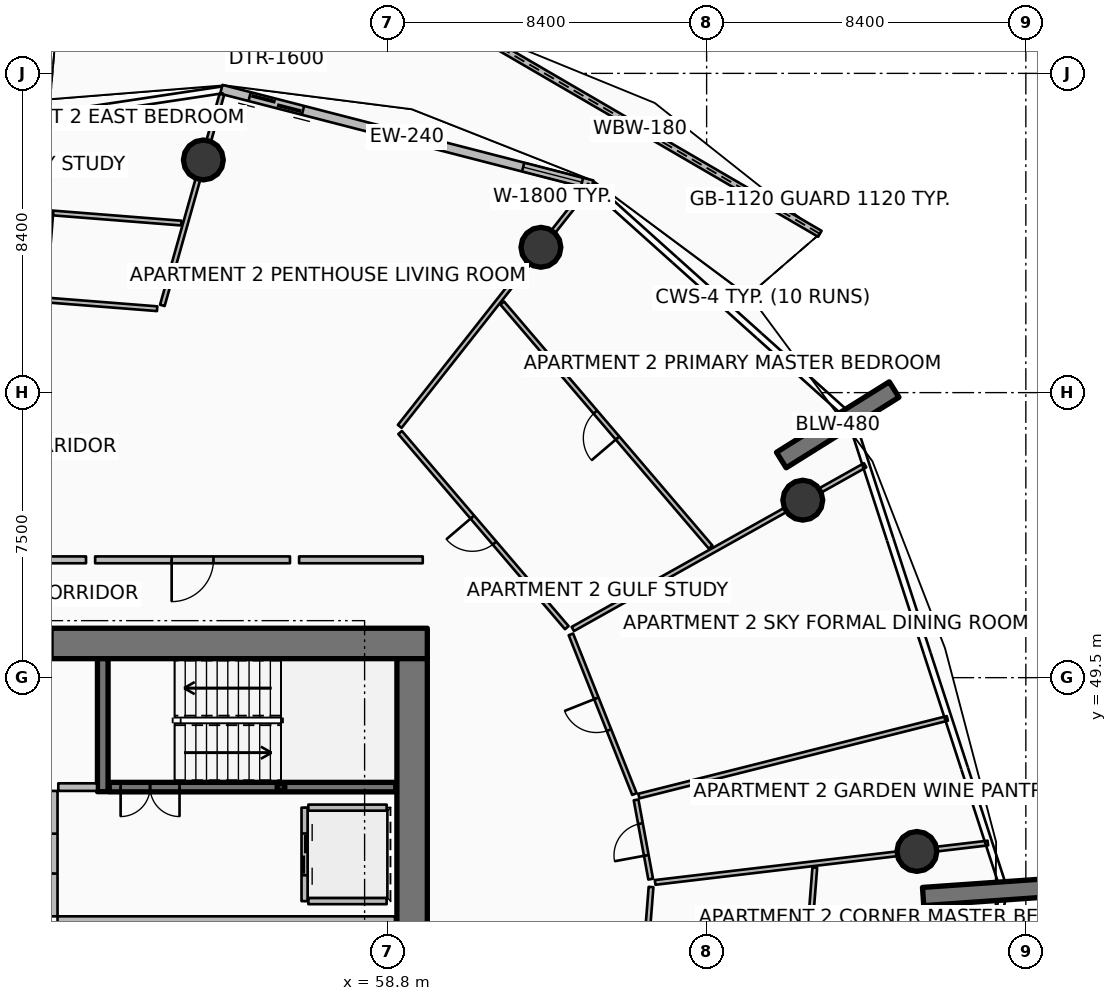
"""IFC4 building model, lengths in metres.
Left out: names, types, materials, properties, quantities, classifications, styles, units other than length and angle.
Written with IfcOpenShell. Run it as: python <this file> out.ifc"""

import sys

from ifc_helpers import new_model, si_unit, direction, frame, frame_2d, origin, origin_2d, place, context, subcontext, project, spatial, polyline, rectangle, hollow_rectangle, circle, outline, extrude, element, fill, save


model = new_model("IFC4")
c1 = context("Model", 3, precision=1e-05, world=origin(), true_north=direction((0.0, 1.0)))
c2 = subcontext(c1, "Body", "Model", "MODEL_VIEW")
j1 = project(units=[si_unit("LENGTHUNIT", "METRE"), si_unit("PLANEANGLEUNIT", "RADIAN")], contexts=[c1])
p1 = place(None, origin())
s1 = spatial("IfcSite", under=j1, at=p1, CompositionType="ELEMENT")
p2 = place(p1, origin())
s2 = spatial("IfcBuilding", under=s1, at=p2, CompositionType="ELEMENT")
p3 = place(p2, frame((0.0, 0.0, 165.3)))
s3 = spatial("IfcBuildingStorey", under=s2, at=p3, CompositionType="ELEMENT", Elevation=165.3)
p4 = place(p3, frame((49.95, 50.4, 0.0), z_axis=(0.0, 0.0, 1.0), x_axis=(1.0, 0.0, 0.0)))
e1 = element("IfcWall", 1, at=p4, inside=s3, PredefinedType="SHEAR", context=c2, shape_type="SweptSolid", body=[
    extrude(rectangle(XDim=9.9, YDim=0.8, at=frame_2d((4.95, 0.0))), origin(), (0.0, 0.0, 1.0), 3.75),
])
p5 = place(p3, frame((59.45, 34.0, 0.0), z_axis=(0.0, 0.0, 1.0), x_axis=(0.0, 1.0, 0.0)))
e2 = element("IfcWall", 2, at=p5, inside=s3, PredefinedType="SHEAR", context=c2, shape_type="SweptSolid", body=[
    extrude(rectangle(XDim=16.0, YDim=0.8, at=frame_2d((8.0, 0.0))), origin(), (0.0, 0.0, 1.0), 3.75),
])
p6 = place(p3, frame((51.31, 46.5, 0.0), z_axis=(0.0, 0.0, 1.0), x_axis=(0.0, 1.0, 0.0)))
e3 = element("IfcWall", 3, at=p6, inside=s3, PredefinedType="SHEAR", context=c2, shape_type="SweptSolid", body=[
    extrude(rectangle(XDim=3.5, YDim=0.28, at=frame_2d((1.75, 0.0))), origin(), (0.0, 0.0, 1.0), 3.75),
])
p7 = place(p3, frame((56.0, 46.62, 0.0), z_axis=(0.0, 0.0, 1.0), x_axis=(1.0, 0.0, 0.0)))
e4 = element("IfcColumn", 4, at=p7, inside=s3, PredefinedType="COLUMN", context=c2, shape_type="SweptSolid", body=[
    extrude(hollow_rectangle(XDim=0.2, YDim=0.2, WallThickness=0.01, InnerFilletRadius=0.01, OuterFilletRadius=0.02, at=origin_2d()), origin(), (0.0, 0.0, 1.0), 1.67),
])
for number, where, z_axis, x_axis in (
    (5, (69.165, 55.226, 0.0), (0.0, 0.0, 1.0), (0.848, 0.53, 0.0)),
    (6, (72.897, 43.741, 0.0), (0.0, 0.0, 1.0), (0.998, 0.07, 0.0)),
):
    element("IfcWall", number, at=place(p3, frame(where, z_axis=z_axis, x_axis=x_axis)), inside=s3, PredefinedType="SOLIDWALL", context=c2, shape_type="SweptSolid", body=[
        extrude(rectangle(XDim=3.5, YDim=0.48, at=frame_2d((1.75, 0.0))), origin(), (0.0, 0.0, 1.0), 3.75),
    ])
for number, where, z_axis, x_axis in (
    (7, (69.73, 54.169, 0.0), (0.0, 0.0, 1.0), (1.0, 0.0, 0.0)),
    (8, (62.84, 60.824, 0.0), (0.0, 0.0, 1.0), (1.0, 0.0, 0.0)),
    (9, (53.957, 63.122, 0.0), (0.0, 0.0, 1.0), (1.0, 0.0, 0.0)),
    (10, (72.733, 44.927, 0.0), (0.0, 0.0, 1.0), (1.0, 0.0, 0.0)),
):
    element("IfcColumn", number, at=place(p3, frame(where, z_axis=z_axis, x_axis=x_axis)), inside=s3, PredefinedType="COLUMN", context=c2, shape_type="SweptSolid", body=[
        extrude(circle(Radius=0.525, at=origin_2d()), origin(), (0.0, 0.0, 1.0), 3.5),
    ])
p8 = place(p3, frame((70.18, 61.179, 0.0), z_axis=(0.0, 0.0, 1.0), x_axis=(-0.863978518166, 0.503528668645, 0.0)))
e11 = element("IfcWall", 11, at=p8, inside=s3, PredefinedType="PARAPET", context=c2, shape_type="SweptSolid", body=[
    extrude(outline(polyline([(0.0, 0.0), (10.953, 0.0), (10.953, 1.832), (5.477, 1.853), (0.0, 1.756), (0.0, 0.0)])), frame((0.0, 0.09, 0.0), z_axis=(0.0, -1.0, 0.0), x_axis=(1.0, 0.0, 0.0)), (0.0, 0.0, 1.0), 0.18),
])
p9 = place(p3, frame((64.192, 62.466, 0.0), z_axis=(0.0, 0.0, 1.0), x_axis=(-0.968379685126, 0.249481032214, 0.0)))
e12 = element("IfcWall", 12, at=p9, inside=s3, PredefinedType="SOLIDWALL", context=c2, shape_type="SweptSolid", body=[
    extrude(rectangle(XDim=10.082, YDim=0.24, at=frame_2d((5.041, 0.0))), origin(), (0.0, 0.0, 1.0), 2.45),
])
p10 = place(p9, frame((7.862, 0.0, 0.0)))
e13 = element("IfcOpeningElement", 13, at=p10, cuts=e12, PredefinedType="OPENING", context=c2, shape_type="SweptSolid", body=[
    extrude(rectangle(XDim=1.45, YDim=2.15, at=frame_2d((0.725, 1.075))), frame((0.0, 0.13, 0.0), z_axis=(0.0, -1.0, 0.0), x_axis=(1.0, 0.0, 0.0)), (0.0, 0.0, 1.0), 0.26),
])
p11 = place(p9, frame((0.28, 0.0, 0.65)))
e14 = element("IfcOpeningElement", 14, at=p11, cuts=e12, PredefinedType="OPENING", context=c2, shape_type="SweptSolid", body=[
    extrude(rectangle(XDim=1.6, YDim=1.5, at=frame_2d((0.8, 0.75))), frame((0.0, 0.13, 0.0), z_axis=(0.0, -1.0, 0.0), x_axis=(1.0, 0.0, 0.0)), (0.0, 0.0, 1.0), 0.26),
])
p12 = place(p3, frame((51.48, 46.62, 0.0), z_axis=(0.0, 0.0, 1.0), x_axis=(1.0, 0.0, 0.0)))
e15 = element("IfcWall", 15, at=p12, inside=s3, PredefinedType="SOLIDWALL", context=c2, shape_type="SweptSolid", body=[
    extrude(rectangle(XDim=7.54, YDim=0.25, at=frame_2d((3.77, 0.0))), origin(), (0.0, 0.0, 1.0), 3.5),
])
p13 = place(p12, frame((0.3, 0.0, 0.0)))
e16 = element("IfcOpeningElement", 16, at=p13, cuts=e15, PredefinedType="OPENING", context=c2, shape_type="SweptSolid", body=[
    extrude(rectangle(XDim=1.55, YDim=2.15, at=frame_2d((0.775, 1.075))), frame((0.0, 0.135, 0.0), z_axis=(0.0, -1.0, 0.0), x_axis=(1.0, 0.0, 0.0)), (0.0, 0.0, 1.0), 0.27),
])
p14 = place(p3, frame((56.62, 46.08, 0.0), z_axis=(0.0, 0.0, 1.0), x_axis=(0.0, -1.0, 0.0)))
e17 = element("IfcWall", 17, at=p14, inside=s3, PredefinedType="PARTITIONING", context=c2, shape_type="SweptSolid", body=[
    extrude(rectangle(XDim=2.46, YDim=0.16, at=frame_2d((1.23, 0.0))), origin(), (0.0, 0.0, 1.0), 3.5),
])
p15 = place(p14, frame((0.68, 0.0, 0.0)))
e18 = element("IfcOpeningElement", 18, at=p15, cuts=e17, PredefinedType="OPENING", context=c2, shape_type="SweptSolid", body=[
    extrude(rectangle(XDim=1.1, YDim=2.1, at=frame_2d((0.55, 1.05))), frame((0.0, 0.09, 0.0), z_axis=(0.0, -1.0, 0.0), x_axis=(1.0, 0.0, 0.0)), (0.0, 0.0, 1.0), 0.18),
])
for number, where, z_axis, x_axis in (
    (19, (56.72, 46.08, 0.0), (0.0, 0.0, 1.0), (1.0, 0.0, 0.0)),
    (20, (56.72, 43.62, 0.0), (0.0, 0.0, 1.0), (1.0, 0.0, 0.0)),
):
    element("IfcWall", number, at=place(p3, frame(where, z_axis=z_axis, x_axis=x_axis)), inside=s3, PredefinedType="PARTITIONING", context=c2, shape_type="SweptSolid", body=[
        extrude(rectangle(XDim=2.06, YDim=0.16, at=frame_2d((1.03, 0.0))), origin(), (0.0, 0.0, 1.0), 3.5),
    ])
p16 = place(p3, frame((50.12, 43.12, 0.0), z_axis=(0.0, 0.0, 1.0), x_axis=(1.0, 0.0, 0.0)))
e21 = element("IfcWall", 21, at=p16, inside=s3, PredefinedType="PARTITIONING", context=c2, shape_type="SweptSolid", body=[
    extrude(rectangle(XDim=8.88, YDim=0.2, at=frame_2d((4.44, 0.0))), origin(), (0.0, 0.0, 1.0), 3.5),
])
p17 = place(p3, frame((50.14, 46.62, 0.0), z_axis=(0.0, 0.0, 1.0), x_axis=(1.0, 0.0, 0.0)))
e22 = element("IfcWall", 22, at=p17, inside=s3, PredefinedType="PARTITIONING", context=c2, shape_type="SweptSolid", body=[
    extrude(rectangle(XDim=1.02, YDim=0.2, at=frame_2d((0.51, 0.0))), origin(), (0.0, 0.0, 1.0), 3.5),
])
p18 = place(p3, frame((50.02, 43.22, 0.0), z_axis=(0.0, 0.0, 1.0), x_axis=(0.0, 1.0, 0.0)))
e23 = element("IfcWall", 23, at=p18, inside=s3, PredefinedType="PARTITIONING", context=c2, shape_type="SweptSolid", body=[
    extrude(rectangle(XDim=3.3, YDim=0.2, at=frame_2d((1.65, 0.0))), origin(), (0.0, 0.0, 1.0), 3.5),
])
p19 = place(p18, frame((1.125, 0.0, 0.0)))
e24 = element("IfcOpeningElement", 24, at=p19, cuts=e23, PredefinedType="OPENING", context=c2, shape_type="SweptSolid", body=[
    extrude(rectangle(XDim=1.05, YDim=2.1, at=frame_2d((0.525, 1.05))), frame((0.0, 0.11, 0.0), z_axis=(0.0, -1.0, 0.0), x_axis=(1.0, 0.0, 0.0)), (0.0, 0.0, 1.0), 0.22),
])
p20 = place(p3, frame((56.236, 52.6, 0.0), z_axis=(0.0, 0.0, 1.0), x_axis=(-1.0, 0.0, 0.0)))
e25 = element("IfcWall", 25, at=p20, inside=s3, PredefinedType="PARTITIONING", context=c2, shape_type="SweptSolid", body=[
    extrude(rectangle(XDim=5.127, YDim=0.18, at=frame_2d((2.563, 0.0))), origin(), (0.0, 0.0, 1.0), 2.94),
])
p21 = place(p20, frame((2.013, 0.0, 0.0)))
e26 = element("IfcOpeningElement", 26, at=p21, cuts=e25, PredefinedType="OPENING", context=c2, shape_type="SweptSolid", body=[
    extrude(rectangle(XDim=1.1, YDim=2.1, at=frame_2d((0.55, 1.05))), frame((0.0, 0.1, 0.0), z_axis=(0.0, -1.0, 0.0), x_axis=(1.0, 0.0, 0.0)), (0.0, 0.0, 1.0), 0.2),
])
p22 = place(p3, frame((65.208, 37.259, 0.0), z_axis=(0.0, 0.0, 1.0), x_axis=(0.078457580711, 0.996917452966, 0.0)))
e27 = element("IfcWall", 27, at=p22, inside=s3, PredefinedType="PARTITIONING", context=c2, shape_type="SweptSolid", body=[
    extrude(rectangle(XDim=6.752, YDim=0.125, at=frame_2d((3.376, 0.0))), origin(), (0.0, 0.0, 1.0), 2.94),
])
p23 = place(p22, frame((2.926, 0.0, 0.0)))
e28 = element("IfcOpeningElement", 28, at=p23, cuts=e27, PredefinedType="OPENING", context=c2, shape_type="SweptSolid", body=[
    extrude(rectangle(XDim=0.9, YDim=2.08, at=frame_2d((0.45, 1.04))), frame((0.0, 0.073, 0.0), z_axis=(0.0, -1.0, 0.0), x_axis=(1.0, 0.0, 0.0)), (0.0, 0.0, 1.0), 0.145),
])
p24 = place(p3, frame((69.384, 36.081, 0.0), z_axis=(0.0, 0.0, 1.0), x_axis=(0.078456019855, 0.996917575805, 0.0)))
e29 = element("IfcWall", 29, at=p24, inside=s3, PredefinedType="PARTITIONING", context=c2, shape_type="SweptSolid", body=[
    extrude(rectangle(XDim=8.446, YDim=0.125, at=frame_2d((4.223, 0.0))), origin(), (0.0, 0.0, 1.0), 2.94),
])
p25 = place(p24, frame((3.773, 0.0, 0.0)))
e30 = element("IfcOpeningElement", 30, at=p25, cuts=e29, PredefinedType="OPENING", context=c2, shape_type="SweptSolid", body=[
    extrude(rectangle(XDim=0.9, YDim=2.08, at=frame_2d((0.45, 1.04))), frame((0.0, 0.073, 0.0), z_axis=(0.0, -1.0, 0.0), x_axis=(1.0, 0.0, 0.0)), (0.0, 0.0, 1.0), 0.145),
])
p26 = place(p3, frame((65.845, 44.112, 0.0), z_axis=(0.0, 0.0, 1.0), x_axis=(0.993069843717, 0.117525680174, 0.0)))
e31 = element("IfcWall", 31, at=p26, inside=s3, PredefinedType="PARTITIONING", context=c2, shape_type="SweptSolid", body=[
    extrude(rectangle(XDim=8.816, YDim=0.125, at=frame_2d((4.408, 0.0))), origin(), (0.0, 0.0, 1.0), 2.94),
])
p27 = place(p3, frame((65.417, 46.385, 0.0), z_axis=(0.0, 0.0, 1.0), x_axis=(0.969748364616, 0.244106758047, 0.0)))
e32 = element("IfcWall", 32, at=p27, inside=s3, PredefinedType="PARTITIONING", context=c2, shape_type="SweptSolid", body=[
    extrude(rectangle(XDim=8.371, YDim=0.125, at=frame_2d((4.186, 0.0))), origin(), (0.0, 0.0, 1.0), 2.94),
])
p28 = place(p3, frame((65.728, 44.199, 0.0), z_axis=(0.0, 0.0, 1.0), x_axis=(-0.181256219824, 0.983435906796, 0.0)))
e33 = element("IfcWall", 33, at=p28, inside=s3, PredefinedType="PARTITIONING", context=c2, shape_type="SweptSolid", body=[
    extrude(rectangle(XDim=2.12, YDim=0.125, at=frame_2d((1.06, 0.0))), origin(), (0.0, 0.0, 1.0), 2.94),
])
p29 = place(p28, frame((0.635, 0.0, 0.0)))
e34 = element("IfcOpeningElement", 34, at=p29, cuts=e33, PredefinedType="OPENING", context=c2, shape_type="SweptSolid", body=[
    extrude(rectangle(XDim=0.85, YDim=2.06, at=frame_2d((0.425, 1.03))), frame((0.0, 0.073, 0.0), z_axis=(0.0, -1.0, 0.0), x_axis=(1.0, 0.0, 0.0)), (0.0, 0.0, 1.0), 0.145),
])
p30 = place(p3, frame((65.3, 46.437, 0.0), z_axis=(0.0, 0.0, 1.0), x_axis=(-0.369584254435, 0.929197222808, 0.0)))
e35 = element("IfcWall", 35, at=p30, inside=s3, PredefinedType="PARTITIONING", context=c2, shape_type="SweptSolid", body=[
    extrude(rectangle(XDim=4.522, YDim=0.125, at=frame_2d((2.261, 0.0))), origin(), (0.0, 0.0, 1.0), 2.94),
])
p31 = place(p30, frame((1.811, 0.0, 0.0)))
e36 = element("IfcOpeningElement", 36, at=p31, cuts=e35, PredefinedType="OPENING", context=c2, shape_type="SweptSolid", body=[
    extrude(rectangle(XDim=0.9, YDim=2.08, at=frame_2d((0.45, 1.04))), frame((0.0, 0.073, 0.0), z_axis=(0.0, -1.0, 0.0), x_axis=(1.0, 0.0, 0.0)), (0.0, 0.0, 1.0), 0.145),
])
p32 = place(p3, frame((59.73, 52.6, 0.0), z_axis=(0.0, 0.0, 1.0), x_axis=(-1.0, 0.0, 0.0)))
e37 = element("IfcWall", 37, at=p32, inside=s3, PredefinedType="PARTITIONING", context=c2, shape_type="SweptSolid", body=[
    extrude(rectangle(XDim=3.254, YDim=0.18, at=frame_2d((1.627, 0.0))), origin(), (0.0, 0.0, 1.0), 2.94),
])
p33 = place(p3, frame((63.679, 50.781, 0.0), z_axis=(0.0, 0.0, 1.0), x_axis=(0.872493265844, 0.488626136281, 0.0)))
e38 = element("IfcWall", 38, at=p33, inside=s3, PredefinedType="PARTITIONING", context=c2, shape_type="SweptSolid", body=[
    extrude(rectangle(XDim=8.816, YDim=0.125, at=frame_2d((4.408, 0.0))), origin(), (0.0, 0.0, 1.0), 2.94),
])
p34 = place(p3, frame((59.125, 56.112, 0.0), z_axis=(0.0, 0.0, 1.0), x_axis=(0.61910151414, 0.78531096719, 0.0)))
e39 = element("IfcWall", 39, at=p34, inside=s3, PredefinedType="PARTITIONING", context=c2, shape_type="SweptSolid", body=[
    extrude(rectangle(XDim=8.082, YDim=0.125, at=frame_2d((4.041, 0.0))), origin(), (0.0, 0.0, 1.0), 2.94),
])
p35 = place(p3, frame((63.52, 50.815, 0.0), z_axis=(0.0, 0.0, 1.0), x_axis=(-0.649447526186, 0.760406411553, 0.0)))
e40 = element("IfcWall", 40, at=p35, inside=s3, PredefinedType="PARTITIONING", context=c2, shape_type="SweptSolid", body=[
    extrude(rectangle(XDim=6.753, YDim=0.125, at=frame_2d((3.376, 0.0))), origin(), (0.0, 0.0, 1.0), 2.94),
])
p36 = place(p35, frame((2.926, 0.0, 0.0)))
e41 = element("IfcOpeningElement", 41, at=p36, cuts=e40, PredefinedType="OPENING", context=c2, shape_type="SweptSolid", body=[
    extrude(rectangle(XDim=0.9, YDim=2.08, at=frame_2d((0.45, 1.04))), frame((0.0, 0.073, 0.0), z_axis=(0.0, -1.0, 0.0), x_axis=(1.0, 0.0, 0.0)), (0.0, 0.0, 1.0), 0.145),
])
p37 = place(p3, frame((67.306, 52.935, 0.0), z_axis=(0.0, 0.0, 1.0), x_axis=(-0.649454860638, 0.760400147287, 0.0)))
e42 = element("IfcWall", 42, at=p37, inside=s3, PredefinedType="PARTITIONING", context=c2, shape_type="SweptSolid", body=[
    extrude(rectangle(XDim=8.446, YDim=0.125, at=frame_2d((4.223, 0.0))), origin(), (0.0, 0.0, 1.0), 2.94),
])
p38 = place(p37, frame((3.773, 0.0, 0.0)))
e43 = element("IfcOpeningElement", 43, at=p38, cuts=e42, PredefinedType="OPENING", context=c2, shape_type="SweptSolid", body=[
    extrude(rectangle(XDim=0.9, YDim=2.08, at=frame_2d((0.45, 1.04))), frame((0.0, 0.073, 0.0), z_axis=(0.0, -1.0, 0.0), x_axis=(1.0, 0.0, 0.0)), (0.0, 0.0, 1.0), 0.145),
])
p39 = place(p3, frame((50.869, 52.6, 0.0), z_axis=(0.0, 0.0, 1.0), x_axis=(-1.0, 0.0, 0.0)))
e44 = element("IfcWall", 44, at=p39, inside=s3, PredefinedType="PARTITIONING", context=c2, shape_type="SweptSolid", body=[
    extrude(rectangle(XDim=4.004, YDim=0.18, at=frame_2d((2.002, 0.0))), origin(), (0.0, 0.0, 1.0), 2.94),
])
p40 = place(p3, frame((52.878, 59.295, 0.0), z_axis=(0.0, 0.0, 1.0), x_axis=(0.271461170106, 0.962449392501, 0.0)))
e45 = element("IfcWall", 45, at=p40, inside=s3, PredefinedType="PARTITIONING", context=c2, shape_type="SweptSolid", body=[
    extrude(rectangle(XDim=5.769, YDim=0.125, at=frame_2d((2.885, 0.0))), origin(), (0.0, 0.0, 1.0), 2.94),
])
p41 = place(p3, frame((52.741, 59.208, 0.0), z_axis=(0.0, 0.0, 1.0), x_axis=(-0.996917452966, 0.078457580711, 0.0)))
e46 = element("IfcWall", 46, at=p41, inside=s3, PredefinedType="PARTITIONING", context=c2, shape_type="SweptSolid", body=[
    extrude(rectangle(XDim=6.752, YDim=0.125, at=frame_2d((3.376, 0.0))), origin(), (0.0, 0.0, 1.0), 2.94),
])
p42 = place(p41, frame((2.926, 0.0, 0.0)))
e47 = element("IfcOpeningElement", 47, at=p42, cuts=e46, PredefinedType="OPENING", context=c2, shape_type="SweptSolid", body=[
    extrude(rectangle(XDim=0.9, YDim=2.08, at=frame_2d((0.45, 1.04))), frame((0.0, 0.073, 0.0), z_axis=(0.0, -1.0, 0.0), x_axis=(1.0, 0.0, 0.0)), (0.0, 0.0, 1.0), 0.145),
])
p43 = place(p3, frame((53.376, 61.461, 0.0), z_axis=(0.0, 0.0, 1.0), x_axis=(-0.996916336075, 0.078471771143, 0.0)))
e48 = element("IfcWall", 48, at=p43, inside=s3, PredefinedType="PARTITIONING", context=c2, shape_type="SweptSolid", body=[
    extrude(rectangle(XDim=7.666, YDim=0.125, at=frame_2d((3.833, 0.0))), origin(), (0.0, 0.0, 1.0), 2.94),
])
p44 = place(p43, frame((3.383, 0.0, 0.0)))
e49 = element("IfcOpeningElement", 49, at=p44, cuts=e48, PredefinedType="OPENING", context=c2, shape_type="SweptSolid", body=[
    extrude(rectangle(XDim=0.9, YDim=2.08, at=frame_2d((0.45, 1.04))), frame((0.0, 0.073, 0.0), z_axis=(0.0, -1.0, 0.0), x_axis=(1.0, 0.0, 0.0)), (0.0, 0.0, 1.0), 0.145),
])
p45 = place(p10, origin())
e50 = element("IfcDoor", 50, at=p45, inside=s3, OperationType="DOUBLE_DOOR_SLIDING", PredefinedType="DOOR", context=c2, shape_type="SweptSolid", body=[
    extrude(rectangle(XDim=1.45, YDim=2.15, at=frame_2d((0.725, 1.075))), frame((0.0, 0.025, 0.0), z_axis=(0.0, -1.0, 0.0), x_axis=(1.0, 0.0, 0.0)), (0.0, 0.0, 1.0), 0.05),
])
fill(e13, e50)
p46 = place(p11, origin())
e51 = element("IfcWindow", 51, at=p46, inside=s3, PartitioningType="SINGLE_PANEL", PredefinedType="WINDOW", context=c2, shape_type="SweptSolid", body=[
    extrude(rectangle(XDim=1.6, YDim=1.5, at=frame_2d((0.8, 0.75))), frame((0.0, 0.03, 0.0), z_axis=(0.0, -1.0, 0.0), x_axis=(1.0, 0.0, 0.0)), (0.0, 0.0, 1.0), 0.06),
])
fill(e14, e51)
p47 = place(p13, origin())
e52 = element("IfcDoor", 52, at=p47, inside=s3, OperationType="DOUBLE_DOOR_SINGLE_SWING", PredefinedType="DOOR", context=c2, shape_type="SweptSolid", body=[
    extrude(rectangle(XDim=1.55, YDim=2.15, at=frame_2d((0.775, 1.075))), frame((0.0, 0.025, 0.0), z_axis=(0.0, -1.0, 0.0), x_axis=(1.0, 0.0, 0.0)), (0.0, 0.0, 1.0), 0.05),
])
fill(e16, e52)
p48 = place(p15, origin())
e53 = element("IfcDoor", 53, at=p48, inside=s3, OperationType="DOUBLE_DOOR_SLIDING", PredefinedType="DOOR", context=c2, shape_type="SweptSolid", body=[
    extrude(rectangle(XDim=1.1, YDim=2.1, at=frame_2d((0.55, 1.05))), frame((0.0, 0.025, 0.0), z_axis=(0.0, -1.0, 0.0), x_axis=(1.0, 0.0, 0.0)), (0.0, 0.0, 1.0), 0.05),
])
fill(e18, e53)
p49 = place(p19, origin())
e54 = element("IfcDoor", 54, at=p49, inside=s3, OperationType="SINGLE_SWING_LEFT", PredefinedType="DOOR", context=c2, shape_type="SweptSolid", body=[
    extrude(rectangle(XDim=1.05, YDim=2.1, at=frame_2d((0.525, 1.05))), frame((0.0, 0.025, 0.0), z_axis=(0.0, -1.0, 0.0), x_axis=(1.0, 0.0, 0.0)), (0.0, 0.0, 1.0), 0.05),
])
fill(e24, e54)
p50 = place(p21, origin())
e55 = element("IfcDoor", 55, at=p50, inside=s3, OperationType="SINGLE_SWING_RIGHT", PredefinedType="DOOR", context=c2, shape_type="SweptSolid", body=[
    extrude(rectangle(XDim=1.1, YDim=2.1, at=frame_2d((0.55, 1.05))), frame((0.0, 0.025, 0.0), z_axis=(0.0, -1.0, 0.0), x_axis=(1.0, 0.0, 0.0)), (0.0, 0.0, 1.0), 0.05),
])
fill(e26, e55)
p51 = place(p29, origin())
e56 = element("IfcDoor", 56, at=p51, inside=s3, OperationType="SINGLE_SWING_LEFT", PredefinedType="DOOR", context=c2, shape_type="SweptSolid", body=[
    extrude(rectangle(XDim=0.85, YDim=2.06, at=frame_2d((0.425, 1.03))), frame((0.0, 0.025, 0.0), z_axis=(0.0, -1.0, 0.0), x_axis=(1.0, 0.0, 0.0)), (0.0, 0.0, 1.0), 0.05),
])
fill(e34, e56)
p52 = place(p31, origin())
e57 = element("IfcDoor", 57, at=p52, inside=s3, OperationType="SINGLE_SWING_RIGHT", PredefinedType="DOOR", context=c2, shape_type="SweptSolid", body=[
    extrude(rectangle(XDim=0.9, YDim=2.08, at=frame_2d((0.45, 1.04))), frame((0.0, 0.025, 0.0), z_axis=(0.0, -1.0, 0.0), x_axis=(1.0, 0.0, 0.0)), (0.0, 0.0, 1.0), 0.05),
])
fill(e36, e57)
p53 = place(p36, origin())
e58 = element("IfcDoor", 58, at=p53, inside=s3, OperationType="SINGLE_SWING_RIGHT", PredefinedType="DOOR", context=c2, shape_type="SweptSolid", body=[
    extrude(rectangle(XDim=0.9, YDim=2.08, at=frame_2d((0.45, 1.04))), frame((0.0, 0.025, 0.0), z_axis=(0.0, -1.0, 0.0), x_axis=(1.0, 0.0, 0.0)), (0.0, 0.0, 1.0), 0.05),
])
fill(e41, e58)
p54 = place(p38, origin())
e59 = element("IfcDoor", 59, at=p54, inside=s3, OperationType="SINGLE_SWING_LEFT", PredefinedType="DOOR", context=c2, shape_type="SweptSolid", body=[
    extrude(rectangle(XDim=0.9, YDim=2.08, at=frame_2d((0.45, 1.04))), frame((0.0, 0.025, 0.0), z_axis=(0.0, -1.0, 0.0), x_axis=(1.0, 0.0, 0.0)), (0.0, 0.0, 1.0), 0.05),
])
fill(e43, e59)
p55 = place(p44, origin())
e60 = element("IfcDoor", 60, at=p55, inside=s3, OperationType="SINGLE_SWING_LEFT", PredefinedType="DOOR", context=c2, shape_type="SweptSolid", body=[
    extrude(rectangle(XDim=0.9, YDim=2.08, at=frame_2d((0.45, 1.04))), frame((0.0, 0.025, 0.0), z_axis=(0.0, -1.0, 0.0), x_axis=(1.0, 0.0, 0.0)), (0.0, 0.0, 1.0), 0.05),
])
fill(e49, e60)
save(model, sys.argv[1])
